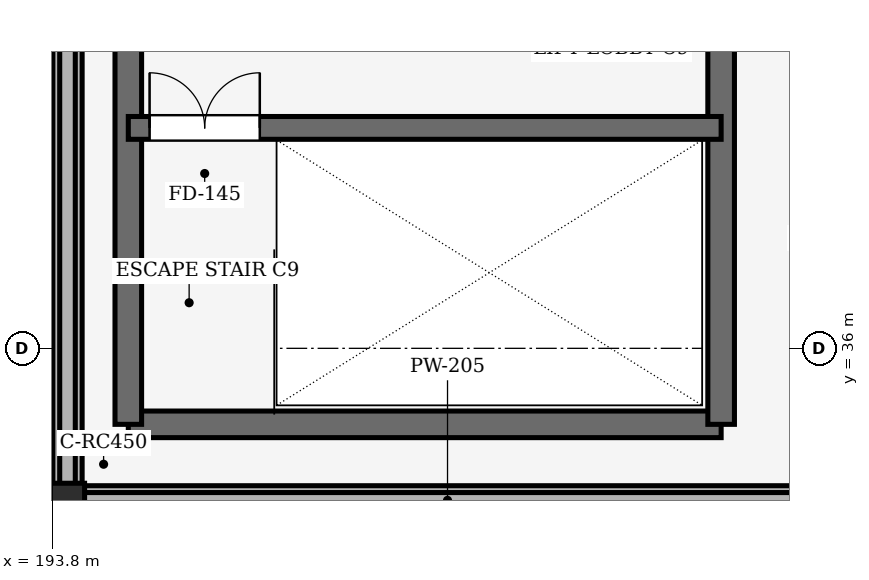
"""IFC4 building model, lengths in metres.
Left out: names, types, materials, properties, quantities, classifications, styles, units other than length and angle.
Written with IfcOpenShell. Run it as: python <this file> out.ifc"""

import sys

from ifc_helpers import new_model, si_unit, direction, frame, frame_2d, origin, origin_2d, place, context, subcontext, project, spatial, rectangle, extrude, element, fill, save


model = new_model("IFC4")
c1 = context("Model", 3, precision=1e-05, world=origin(), true_north=direction((0.0, 1.0)))
c2 = subcontext(c1, "Body", "Model", "MODEL_VIEW")
j1 = project(units=[si_unit("LENGTHUNIT", "METRE"), si_unit("PLANEANGLEUNIT", "RADIAN")], contexts=[c1])
p1 = place(None, origin())
s1 = spatial("IfcSite", under=j1, at=p1, CompositionType="ELEMENT")
p2 = place(p1, origin())
s2 = spatial("IfcBuilding", under=s1, at=p2, CompositionType="ELEMENT")
p3 = place(p2, frame((0.0, 0.0, 10.8)))
s3 = spatial("IfcBuildingStorey", under=s2, at=p3, CompositionType="ELEMENT", Elevation=10.8)
p4 = place(p3, frame((194.0, 34.0, 0.0), z_axis=(0.0, 0.0, 1.0), x_axis=(1.0, 0.0, 0.0)))
e1 = element("IfcColumn", 1, at=p4, inside=s3, PredefinedType="COLUMN", context=c2, shape_type="SweptSolid", body=[
    extrude(rectangle(XDim=0.45, YDim=0.45, at=origin_2d()), origin(), (0.0, 0.0, 1.0), 5.4),
])
p5 = place(p3, frame((194.0, 48.0, 0.0), z_axis=(0.0, 0.0, 1.0), x_axis=(0.0, -1.0, 0.0)))
e2 = element("IfcWall", 2, at=p5, inside=s3, PredefinedType="SOLIDWALL", context=c2, shape_type="SweptSolid", body=[
    extrude(rectangle(XDim=14.0, YDim=0.385, at=frame_2d((7.0, 0.0))), origin(), (0.0, 0.0, 1.0), 4.35),
])
p6 = place(p3, frame((194.0, 34.0, 0.0), z_axis=(0.0, 0.0, 1.0), x_axis=(1.0, 0.0, 0.0)))
e3 = element("IfcWall", 3, at=p6, inside=s3, PredefinedType="SOLIDWALL", context=c2, shape_type="SweptSolid", body=[
    extrude(rectangle(XDim=10.0, YDim=0.385, at=frame_2d((5.0, 0.0))), origin(), (0.0, 0.0, 1.0), 4.35),
])
p7 = place(p3, frame((194.0, 34.0, 5.4), z_axis=(0.0, 0.0, 1.0), x_axis=(1.0, 0.0, 0.0)))
e4 = element("IfcWall", 4, at=p7, inside=s3, PredefinedType="PARAPET", context=c2, shape_type="SweptSolid", body=[
    extrude(rectangle(XDim=10.0, YDim=0.205, at=frame_2d((5.0, 0.0))), origin(), (0.0, 0.0, 1.0), 1.15),
])
p8 = place(p3, frame((194.0, 118.0, 5.4), z_axis=(0.0, 0.0, 1.0), x_axis=(0.0, -1.0, 0.0)))
e5 = element("IfcWall", 5, at=p8, inside=s3, PredefinedType="PARAPET", context=c2, shape_type="SweptSolid", body=[
    extrude(rectangle(XDim=84.0, YDim=0.205, at=frame_2d((42.0, 0.0))), origin(), (0.0, 0.0, 1.0), 1.15),
])
p9 = place(p3, frame((194.8, 35.0, 0.0), z_axis=(0.0, 0.0, 1.0), x_axis=(1.0, 0.0, 0.0)))
e6 = element("IfcWall", 6, at=p9, inside=s3, PredefinedType="SHEAR", context=c2, shape_type="SweptSolid", body=[
    extrude(rectangle(XDim=7.8, YDim=0.35, at=frame_2d((3.9, 0.0))), origin(), (0.0, 0.0, 1.0), 5.4),
])
for number, where, z_axis, x_axis in (
    (7, (194.8, 43.6, 0.0), (0.0, 0.0, 1.0), (0.0, -1.0, 0.0)),
    (8, (202.6, 35.0, 0.0), (0.0, 0.0, 1.0), (0.0, 1.0, 0.0)),
):
    element("IfcWall", number, at=place(p3, frame(where, z_axis=z_axis, x_axis=x_axis)), inside=s3, PredefinedType="SHEAR", context=c2, shape_type="SweptSolid", body=[
        extrude(rectangle(XDim=8.6, YDim=0.35, at=frame_2d((4.3, 0.0))), origin(), (0.0, 0.0, 1.0), 5.4),
    ])
p10 = place(p3, frame((194.8, 38.9, 0.0), z_axis=(0.0, 0.0, 1.0), x_axis=(1.0, 0.0, 0.0)))
e9 = element("IfcWall", 9, at=p10, inside=s3, PredefinedType="SHEAR", context=c2, shape_type="SweptSolid", body=[
    extrude(rectangle(XDim=7.8, YDim=0.3, at=frame_2d((3.9, 0.0))), origin(), (0.0, 0.0, 1.0), 5.4),
])
p11 = place(p10, frame((0.28, 0.0, 0.0)))
e10 = element("IfcOpeningElement", 10, at=p11, cuts=e9, PredefinedType="OPENING", context=c2, shape_type="SweptSolid", body=[
    extrude(rectangle(XDim=1.45, YDim=2.15, at=frame_2d((0.725, 1.075))), frame((0.0, 0.16, 0.0), z_axis=(0.0, -1.0, 0.0), x_axis=(1.0, 0.0, 0.0)), (0.0, 0.0, 1.0), 0.32),
])
p12 = place(p11, origin())
e11 = element("IfcDoor", 11, at=p12, inside=s3, OperationType="DOUBLE_DOOR_SINGLE_SWING", PredefinedType="DOOR", context=c2, shape_type="SweptSolid", body=[
    extrude(rectangle(XDim=1.45, YDim=2.15, at=frame_2d((0.725, 1.075))), frame((0.0, 0.025, 0.0), z_axis=(0.0, -1.0, 0.0), x_axis=(1.0, 0.0, 0.0)), (0.0, 0.0, 1.0), 0.05),
])
fill(e10, e11)
save(model, sys.argv[1])
